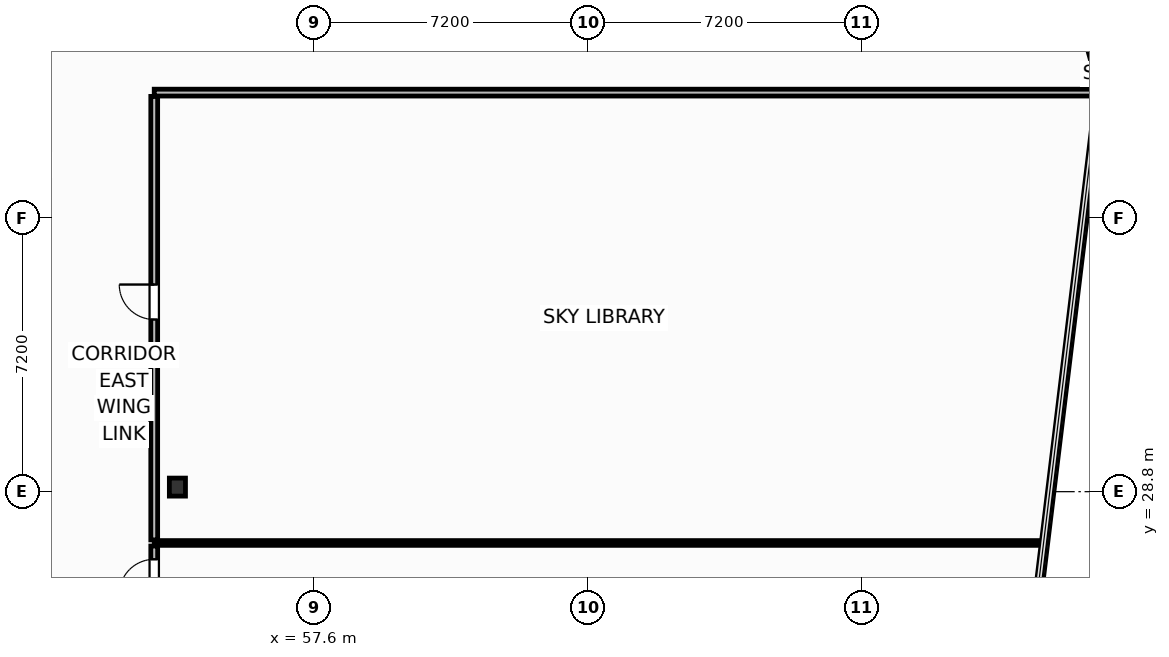
"""IFC4 building model, lengths in metres.
Left out: names, types, materials, properties, quantities, classifications, styles, units other than length and angle.
Written with IfcOpenShell. Run it as: python <this file> out.ifc"""

import sys

from ifc_helpers import new_model, si_unit, direction, frame, frame_2d, origin, origin_2d, place, context, subcontext, project, spatial, rectangle, i_section, extrude, element, fill, save


model = new_model("IFC4")
c1 = context("Model", 3, precision=1e-05, world=origin(), true_north=direction((0.0, 1.0)))
c2 = subcontext(c1, "Body", "Model", "MODEL_VIEW")
j1 = project(units=[si_unit("LENGTHUNIT", "METRE"), si_unit("PLANEANGLEUNIT", "RADIAN")], contexts=[c1])
p1 = place(None, origin())
s1 = spatial("IfcSite", under=j1, at=p1, CompositionType="ELEMENT")
p2 = place(p1, origin())
s2 = spatial("IfcBuilding", under=s1, at=p2, CompositionType="ELEMENT")
p3 = place(p2, frame((0.0, 0.0, 121.7)))
s3 = spatial("IfcBuildingStorey", under=s2, at=p3, CompositionType="ELEMENT", Elevation=121.7)
p4 = place(p3, frame((54.0, 28.92, 0.0), z_axis=(0.0, 0.0, 1.0), x_axis=(1.0, 0.0, 0.0)))
e1 = element("IfcColumn", 1, at=p4, inside=s3, PredefinedType="COLUMN", context=c2, shape_type="SweptSolid", body=[
    extrude(i_section(OverallWidth=0.424, OverallDepth=0.474, WebThickness=0.048, FlangeThickness=0.077, FilletRadius=0.025, at=origin_2d()), origin(), (0.0, 0.0, 1.0), 3.7),
])
p5 = place(p3, frame((78.155, 40.109, 0.0), z_axis=(0.0, 0.0, 1.0), x_axis=(-0.268639368869, 0.963240826322, 0.0)))
e2 = element("IfcWall", 2, at=p5, inside=s3, PredefinedType="SOLIDWALL", context=c2, shape_type="SweptSolid", body=[
    extrude(rectangle(XDim=1.353, YDim=0.22, at=frame_2d((0.677, 0.0))), origin(), (0.0, 0.0, 1.0), 2.73),
])
p6 = place(p3, frame((53.39, 19.3, 0.0), z_axis=(0.0, 0.0, 1.0), x_axis=(0.0, 1.0, 0.0)))
e3 = element("IfcWall", 3, at=p6, inside=s3, PredefinedType="PARTITIONING", context=c2, shape_type="SweptSolid", body=[
    extrude(rectangle(XDim=8.07, YDim=0.18, at=frame_2d((4.035, 0.0))), origin(), (0.0, 0.0, 1.0), 3.45),
])
p7 = place(p6, frame((6.8, 0.0, 0.0)))
e4 = element("IfcOpeningElement", 4, at=p7, cuts=e3, PredefinedType="OPENING", context=c2, shape_type="SweptSolid", body=[
    extrude(rectangle(XDim=0.92, YDim=2.05, at=frame_2d((0.46, 1.025))), frame((0.0, 0.1, 0.0), z_axis=(0.0, -1.0, 0.0), x_axis=(1.0, 0.0, 0.0)), (0.0, 0.0, 1.0), 0.2),
])
p8 = place(p3, frame((53.39, 27.53, 0.0), z_axis=(0.0, 0.0, 1.0), x_axis=(0.0, 1.0, 0.0)))
e5 = element("IfcWall", 5, at=p8, inside=s3, PredefinedType="PARTITIONING", context=c2, shape_type="SweptSolid", body=[
    extrude(rectangle(XDim=11.67, YDim=0.18, at=frame_2d((5.835, 0.0))), origin(), (0.0, 0.0, 1.0), 3.45),
])
p9 = place(p8, frame((5.8, 0.0, 0.0)))
e6 = element("IfcOpeningElement", 6, at=p9, cuts=e5, PredefinedType="OPENING", context=c2, shape_type="SweptSolid", body=[
    extrude(rectangle(XDim=0.92, YDim=2.05, at=frame_2d((0.46, 1.025))), frame((0.0, 0.1, 0.0), z_axis=(0.0, -1.0, 0.0), x_axis=(1.0, 0.0, 0.0)), (0.0, 0.0, 1.0), 0.2),
])
p10 = place(p3, frame((53.39, 27.45, 0.0), z_axis=(0.0, 0.0, 1.0), x_axis=(1.0, 0.0, 0.0)))
e7 = element("IfcWall", 7, at=p10, inside=s3, PredefinedType="PARTITIONING", context=c2, shape_type="SweptSolid", body=[
    extrude(rectangle(XDim=23.362, YDim=0.125, at=frame_2d((11.681, 0.0))), origin(), (0.0, 0.0, 1.0), 3.45),
])
p11 = place(p3, frame((53.39, 39.3, 0.0), z_axis=(0.0, 0.0, 1.0), x_axis=(1.0, 0.0, 0.0)))
e8 = element("IfcWall", 8, at=p11, inside=s3, PredefinedType="PARTITIONING", context=c2, shape_type="SweptSolid", body=[
    extrude(rectangle(XDim=24.74, YDim=0.18, at=frame_2d((12.37, 0.0))), origin(), (0.0, 0.0, 1.0), 3.45),
])
p12 = place(p7, origin())
e9 = element("IfcDoor", 9, at=p12, inside=s3, OperationType="SINGLE_SWING_LEFT", PredefinedType="DOOR", context=c2, shape_type="SweptSolid", body=[
    extrude(rectangle(XDim=0.92, YDim=2.05, at=frame_2d((0.46, 1.025))), frame((0.0, 0.025, 0.0), z_axis=(0.0, -1.0, 0.0), x_axis=(1.0, 0.0, 0.0)), (0.0, 0.0, 1.0), 0.05),
])
fill(e4, e9)
p13 = place(p9, origin())
e10 = element("IfcDoor", 10, at=p13, inside=s3, OperationType="SINGLE_SWING_RIGHT", PredefinedType="DOOR", context=c2, shape_type="SweptSolid", body=[
    extrude(rectangle(XDim=0.92, YDim=2.05, at=frame_2d((0.46, 1.025))), frame((0.0, 0.025, 0.0), z_axis=(0.0, -1.0, 0.0), x_axis=(1.0, 0.0, 0.0)), (0.0, 0.0, 1.0), 0.05),
])
fill(e6, e10)
save(model, sys.argv[1])
